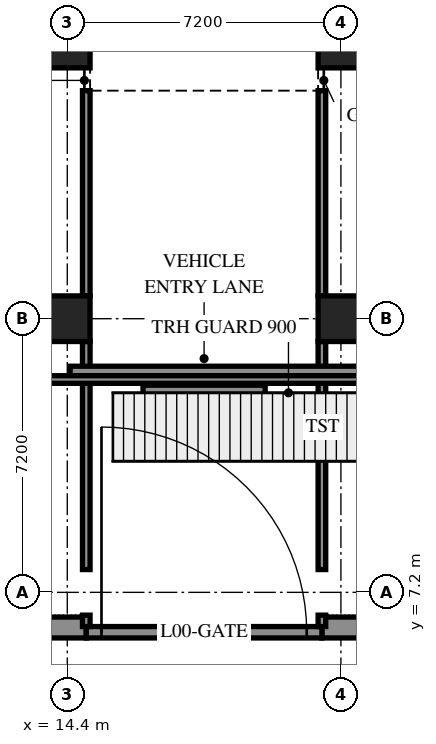
"""IFC4 building model, lengths in metres.
Left out: names, types, materials, properties, quantities, classifications, styles, units other than length and angle.
Written with IfcOpenShell. Run it as: python <this file> out.ifc"""

import sys

from ifc_helpers import new_model, si_unit, direction, frame, frame_2d, origin, origin_2d, place, context, subcontext, project, spatial, polyline, rectangle, outline, extrude, element, fill, save


model = new_model("IFC4")
c1 = context("Model", 3, precision=1e-05, world=origin(), true_north=direction((0.0, 1.0)))
c2 = subcontext(c1, "Body", "Model", "MODEL_VIEW")
j1 = project(units=[si_unit("LENGTHUNIT", "METRE"), si_unit("PLANEANGLEUNIT", "RADIAN")], contexts=[c1])
p1 = place(None, origin())
s1 = spatial("IfcSite", under=j1, at=p1, CompositionType="ELEMENT")
p2 = place(p1, origin())
s2 = spatial("IfcBuilding", under=s1, at=p2, CompositionType="ELEMENT")
p3 = place(p2, origin())
s3 = spatial("IfcBuildingStorey", under=s2, at=p3, CompositionType="ELEMENT", Elevation=0.0)
for number, where, z_axis, x_axis in (
    (1, (14.4, 14.4, 0.0), (0.0, 0.0, 1.0), (1.0, 0.0, 0.0)),
    (2, (14.4, 21.6, 0.0), (0.0, 0.0, 1.0), (1.0, 0.0, 0.0)),
    (3, (21.6, 14.4, 0.0), (0.0, 0.0, 1.0), (1.0, 0.0, 0.0)),
    (4, (21.6, 21.6, 0.0), (0.0, 0.0, 1.0), (1.0, 0.0, 0.0)),
):
    element("IfcColumn", number, at=place(p3, frame(where, z_axis=z_axis, x_axis=x_axis)), inside=s3, PredefinedType="COLUMN", context=c2, shape_type="SweptSolid", body=[
        extrude(rectangle(XDim=1.2, YDim=1.2, at=origin_2d()), origin(), (0.0, 0.0, 1.0), 5.6),
    ])
p4 = place(p3, frame((13.475, 6.275, 0.0), z_axis=(0.0, 0.0, 1.0), x_axis=(1.0, 0.0, 0.0)))
e5 = element("IfcWall", 5, at=p4, inside=s3, PredefinedType="SOLIDWALL", context=c2, shape_type="SweptSolid", body=[
    extrude(outline(polyline([(-0.275, -0.275), (1.425, -0.275), (1.425, 0.275), (0.275, 0.275), (-0.275, -0.275)])), origin(), (0.0, 0.0, 1.0), 5.6),
])
p5 = place(p3, frame((21.1, 6.275, 0.0), z_axis=(0.0, 0.0, 1.0), x_axis=(1.0, 0.0, 0.0)))
e6 = element("IfcWall", 6, at=p5, inside=s3, PredefinedType="SOLIDWALL", context=c2, shape_type="SweptSolid", body=[
    extrude(outline(polyline([(0.0, -0.275), (52.1, -0.275), (51.55, 0.275), (0.0, 0.275), (0.0, -0.275)])), origin(), (0.0, 0.0, 1.0), 5.6),
])
p6 = place(p5, frame((1.4, 0.0, 0.7)))
e7 = element("IfcOpeningElement", 7, at=p6, cuts=e6, PredefinedType="OPENING", context=c2, shape_type="SweptSolid", body=[
    extrude(rectangle(XDim=1.8, YDim=3.4, at=frame_2d((0.9, 1.7))), frame((0.0, 0.285, 0.0), z_axis=(0.0, -1.0, 0.0), x_axis=(1.0, 0.0, 0.0)), (0.0, 0.0, 1.0), 0.57),
])
p7 = place(p5, frame((5.0, 0.0, 0.7)))
e8 = element("IfcOpeningElement", 8, at=p7, cuts=e6, PredefinedType="OPENING", context=c2, shape_type="SweptSolid", body=[
    extrude(rectangle(XDim=1.8, YDim=3.4, at=frame_2d((0.9, 1.7))), frame((0.0, 0.285, 0.0), z_axis=(0.0, -1.0, 0.0), x_axis=(1.0, 0.0, 0.0)), (0.0, 0.0, 1.0), 0.57),
])
p8 = place(p5, frame((8.6, 0.0, 0.7)))
e9 = element("IfcOpeningElement", 9, at=p8, cuts=e6, PredefinedType="OPENING", context=c2, shape_type="SweptSolid", body=[
    extrude(rectangle(XDim=1.8, YDim=3.4, at=frame_2d((0.9, 1.7))), frame((0.0, 0.285, 0.0), z_axis=(0.0, -1.0, 0.0), x_axis=(1.0, 0.0, 0.0)), (0.0, 0.0, 1.0), 0.57),
])
p9 = place(p5, frame((12.2, 0.0, 0.7)))
e10 = element("IfcOpeningElement", 10, at=p9, cuts=e6, PredefinedType="OPENING", context=c2, shape_type="SweptSolid", body=[
    extrude(rectangle(XDim=1.8, YDim=3.4, at=frame_2d((0.9, 1.7))), frame((0.0, 0.285, 0.0), z_axis=(0.0, -1.0, 0.0), x_axis=(1.0, 0.0, 0.0)), (0.0, 0.0, 1.0), 0.57),
])
p10 = place(p5, frame((15.8, 0.0, 0.7)))
e11 = element("IfcOpeningElement", 11, at=p10, cuts=e6, PredefinedType="OPENING", context=c2, shape_type="SweptSolid", body=[
    extrude(rectangle(XDim=1.8, YDim=3.4, at=frame_2d((0.9, 1.7))), frame((0.0, 0.285, 0.0), z_axis=(0.0, -1.0, 0.0), x_axis=(1.0, 0.0, 0.0)), (0.0, 0.0, 1.0), 0.57),
])
p11 = place(p5, frame((19.4, 0.0, 0.7)))
e12 = element("IfcOpeningElement", 12, at=p11, cuts=e6, PredefinedType="OPENING", context=c2, shape_type="SweptSolid", body=[
    extrude(rectangle(XDim=1.8, YDim=3.4, at=frame_2d((0.9, 1.7))), frame((0.0, 0.285, 0.0), z_axis=(0.0, -1.0, 0.0), x_axis=(1.0, 0.0, 0.0)), (0.0, 0.0, 1.0), 0.57),
])
p12 = place(p5, frame((23.0, 0.0, 0.7)))
e13 = element("IfcOpeningElement", 13, at=p12, cuts=e6, PredefinedType="OPENING", context=c2, shape_type="SweptSolid", body=[
    extrude(rectangle(XDim=1.8, YDim=3.4, at=frame_2d((0.9, 1.7))), frame((0.0, 0.285, 0.0), z_axis=(0.0, -1.0, 0.0), x_axis=(1.0, 0.0, 0.0)), (0.0, 0.0, 1.0), 0.57),
])
p13 = place(p5, frame((26.6, 0.0, 0.7)))
e14 = element("IfcOpeningElement", 14, at=p13, cuts=e6, PredefinedType="OPENING", context=c2, shape_type="SweptSolid", body=[
    extrude(rectangle(XDim=1.8, YDim=3.4, at=frame_2d((0.9, 1.7))), frame((0.0, 0.285, 0.0), z_axis=(0.0, -1.0, 0.0), x_axis=(1.0, 0.0, 0.0)), (0.0, 0.0, 1.0), 0.57),
])
p14 = place(p5, frame((30.2, 0.0, 0.7)))
e15 = element("IfcOpeningElement", 15, at=p14, cuts=e6, PredefinedType="OPENING", context=c2, shape_type="SweptSolid", body=[
    extrude(rectangle(XDim=1.8, YDim=3.4, at=frame_2d((0.9, 1.7))), frame((0.0, 0.285, 0.0), z_axis=(0.0, -1.0, 0.0), x_axis=(1.0, 0.0, 0.0)), (0.0, 0.0, 1.0), 0.57),
])
p15 = place(p5, frame((33.8, 0.0, 0.7)))
e16 = element("IfcOpeningElement", 16, at=p15, cuts=e6, PredefinedType="OPENING", context=c2, shape_type="SweptSolid", body=[
    extrude(rectangle(XDim=1.8, YDim=3.4, at=frame_2d((0.9, 1.7))), frame((0.0, 0.285, 0.0), z_axis=(0.0, -1.0, 0.0), x_axis=(1.0, 0.0, 0.0)), (0.0, 0.0, 1.0), 0.57),
])
p16 = place(p5, frame((37.4, 0.0, 0.7)))
e17 = element("IfcOpeningElement", 17, at=p16, cuts=e6, PredefinedType="OPENING", context=c2, shape_type="SweptSolid", body=[
    extrude(rectangle(XDim=1.8, YDim=3.4, at=frame_2d((0.9, 1.7))), frame((0.0, 0.285, 0.0), z_axis=(0.0, -1.0, 0.0), x_axis=(1.0, 0.0, 0.0)), (0.0, 0.0, 1.0), 0.57),
])
p17 = place(p5, frame((41.0, 0.0, 0.7)))
e18 = element("IfcOpeningElement", 18, at=p17, cuts=e6, PredefinedType="OPENING", context=c2, shape_type="SweptSolid", body=[
    extrude(rectangle(XDim=1.8, YDim=3.4, at=frame_2d((0.9, 1.7))), frame((0.0, 0.285, 0.0), z_axis=(0.0, -1.0, 0.0), x_axis=(1.0, 0.0, 0.0)), (0.0, 0.0, 1.0), 0.57),
])
p18 = place(p5, frame((44.6, 0.0, 0.7)))
e19 = element("IfcOpeningElement", 19, at=p18, cuts=e6, PredefinedType="OPENING", context=c2, shape_type="SweptSolid", body=[
    extrude(rectangle(XDim=1.8, YDim=3.4, at=frame_2d((0.9, 1.7))), frame((0.0, 0.285, 0.0), z_axis=(0.0, -1.0, 0.0), x_axis=(1.0, 0.0, 0.0)), (0.0, 0.0, 1.0), 0.57),
])
p19 = place(p5, frame((48.2, 0.0, 0.7)))
e20 = element("IfcOpeningElement", 20, at=p19, cuts=e6, PredefinedType="OPENING", context=c2, shape_type="SweptSolid", body=[
    extrude(rectangle(XDim=1.8, YDim=3.4, at=frame_2d((0.9, 1.7))), frame((0.0, 0.285, 0.0), z_axis=(0.0, -1.0, 0.0), x_axis=(1.0, 0.0, 0.0)), (0.0, 0.0, 1.0), 0.57),
])
p20 = place(p3, frame((22.068, 12.35, 0.0), z_axis=(0.0, 0.0, 1.0), x_axis=(0.0, -1.0, 0.0)))
e21 = element("IfcWall", 21, at=p20, inside=s3, PredefinedType="SOLIDWALL", context=c2, shape_type="SweptSolid", body=[
    extrude(rectangle(XDim=1.6, YDim=0.3, at=frame_2d((0.8, 0.0))), origin(), (0.0, 0.0, 1.0), 3.877),
])
p21 = place(p3, frame((18.834, 12.35, 0.0), z_axis=(0.0, 0.0, 1.0), x_axis=(0.0, -1.0, 0.0)))
e22 = element("IfcWall", 22, at=p21, inside=s3, PredefinedType="SOLIDWALL", context=c2, shape_type="SweptSolid", body=[
    extrude(rectangle(XDim=1.6, YDim=0.3, at=frame_2d((0.8, 0.0))), origin(), (0.0, 0.0, 1.0), 1.838),
])
p22 = place(p3, frame((14.9, 6.15, 0.0), z_axis=(0.0, 0.0, 1.0), x_axis=(1.0, 0.0, 0.0)))
e23 = element("IfcWall", 23, at=p22, inside=s3, PredefinedType="PARTITIONING", context=c2, shape_type="SweptSolid", body=[
    extrude(rectangle(XDim=6.2, YDim=0.3, at=frame_2d((3.1, 0.0))), origin(), (0.0, 0.0, 1.0), 5.6),
])
p23 = place(p22, frame((0.4, 0.0, 0.0)))
e24 = element("IfcOpeningElement", 24, at=p23, cuts=e23, PredefinedType="OPENING", context=c2, shape_type="SweptSolid", body=[
    extrude(rectangle(XDim=5.4, YDim=4.5, at=frame_2d((2.7, 2.25))), frame((0.0, 0.16, 0.0), z_axis=(0.0, -1.0, 0.0), x_axis=(1.0, 0.0, 0.0)), (0.0, 0.0, 1.0), 0.32),
])
p24 = place(p3, frame((14.9, 6.3, 0.0), z_axis=(0.0, 0.0, 1.0), x_axis=(0.0, 1.0, 0.0)))
e25 = element("IfcWall", 25, at=p24, inside=s3, PredefinedType="PARTITIONING", context=c2, shape_type="SweptSolid", body=[
    extrude(rectangle(XDim=0.3, YDim=0.2, at=frame_2d((0.15, 0.0))), origin(), (0.0, 0.0, 1.0), 5.6),
])
p25 = place(p3, frame((14.9, 7.8, 0.0), z_axis=(0.0, 0.0, 1.0), x_axis=(0.0, 1.0, 0.0)))
e26 = element("IfcWall", 26, at=p25, inside=s3, PredefinedType="PARTITIONING", context=c2, shape_type="SweptSolid", body=[
    extrude(rectangle(XDim=6.0, YDim=0.2, at=frame_2d((3.0, 0.0))), origin(), (0.0, 0.0, 1.0), 5.6),
])
p26 = place(p3, frame((14.9, 15.0, 0.0), z_axis=(0.0, 0.0, 1.0), x_axis=(0.0, 1.0, 0.0)))
e27 = element("IfcWall", 27, at=p26, inside=s3, PredefinedType="PARTITIONING", context=c2, shape_type="SweptSolid", body=[
    extrude(rectangle(XDim=5.4, YDim=0.2, at=frame_2d((2.7, 0.0))), origin(), (0.0, 0.0, 1.0), 5.6),
])
p27 = place(p3, frame((21.1, 6.3, 0.0), z_axis=(0.0, 0.0, 1.0), x_axis=(0.0, 1.0, 0.0)))
e28 = element("IfcWall", 28, at=p27, inside=s3, PredefinedType="PARTITIONING", context=c2, shape_type="SweptSolid", body=[
    extrude(rectangle(XDim=0.3, YDim=0.2, at=frame_2d((0.15, 0.0))), origin(), (0.0, 0.0, 1.0), 5.6),
])
p28 = place(p3, frame((21.1, 7.8, 0.0), z_axis=(0.0, 0.0, 1.0), x_axis=(0.0, 1.0, 0.0)))
e29 = element("IfcWall", 29, at=p28, inside=s3, PredefinedType="PARTITIONING", context=c2, shape_type="SweptSolid", body=[
    extrude(rectangle(XDim=6.0, YDim=0.2, at=frame_2d((3.0, 0.0))), origin(), (0.0, 0.0, 1.0), 5.6),
])
p29 = place(p3, frame((21.1, 15.0, 0.0), z_axis=(0.0, 0.0, 1.0), x_axis=(0.0, 1.0, 0.0)))
e30 = element("IfcWall", 30, at=p29, inside=s3, PredefinedType="PARTITIONING", context=c2, shape_type="SweptSolid", body=[
    extrude(rectangle(XDim=5.4, YDim=0.2, at=frame_2d((2.7, 0.0))), origin(), (0.0, 0.0, 1.0), 5.6),
])
p30 = place(p3, frame((71.925, 13.025, 0.0), z_axis=(0.0, 0.0, 1.0), x_axis=(-1.0, 0.0, 0.0)))
e31 = element("IfcWall", 31, at=p30, inside=s3, PredefinedType="SOLIDWALL", context=c2, shape_type="SweptSolid", body=[
    extrude(rectangle(XDim=57.45, YDim=0.25, at=frame_2d((28.725, 0.0))), origin(), (0.0, 0.0, 1.0), 5.6),
])
p31 = place(p30, frame((12.325, 0.0, 0.0)))
e32 = element("IfcOpeningElement", 32, at=p31, cuts=e31, PredefinedType="OPENING", context=c2, shape_type="SweptSolid", body=[
    extrude(rectangle(XDim=1.0, YDim=2.1, at=frame_2d((0.5, 1.05))), frame((0.0, 0.135, 0.0), z_axis=(0.0, -1.0, 0.0), x_axis=(1.0, 0.0, 0.0)), (0.0, 0.0, 1.0), 0.27),
])
p32 = place(p30, frame((44.125, 0.0, 0.0)))
e33 = element("IfcOpeningElement", 33, at=p32, cuts=e31, PredefinedType="OPENING", context=c2, shape_type="SweptSolid", body=[
    extrude(rectangle(XDim=1.0, YDim=2.1, at=frame_2d((0.5, 1.05))), frame((0.0, 0.135, 0.0), z_axis=(0.0, -1.0, 0.0), x_axis=(1.0, 0.0, 0.0)), (0.0, 0.0, 1.0), 0.27),
])
p33 = place(p3, frame((26.53, 12.8, 0.0), z_axis=(0.0, 0.0, 1.0), x_axis=(-1.0, 0.0, 0.0)))
e34 = element("IfcWall", 34, at=p33, inside=s3, PredefinedType="PARAPET", context=c2, shape_type="SweptSolid", body=[
    extrude(outline(polyline([(0.0, -0.1), (12.78, -0.1), (12.78, 0.1), (0.0, 0.1), (0.0, -0.1)])), origin(), (0.0, 0.0, 1.0), 0.25),
])
p34 = place(p3, frame((19.607, 12.25, 0.0), z_axis=(0.0, 0.0, 1.0), x_axis=(-1.0, 0.0, 0.0)))
e35 = element("IfcWall", 35, at=p34, inside=s3, PredefinedType="SOLIDWALL", context=c2, shape_type="SweptSolid", body=[
    extrude(outline(polyline([(0.0, -0.4), (3.214, -0.4), (3.214, 0.4), (0.0, 0.4), (0.0, -0.4)])), origin(), (0.0, 0.0, 1.0), 0.65),
])
p35 = place(p23, origin())
e36 = element("IfcDoor", 36, at=p35, inside=s3, OperationType="ROLLINGUP", PredefinedType="GATE", context=c2, shape_type="SweptSolid", body=[
    extrude(rectangle(XDim=5.4, YDim=4.5, at=frame_2d((2.7, 2.25))), frame((0.0, 0.025, 0.0), z_axis=(0.0, -1.0, 0.0), x_axis=(1.0, 0.0, 0.0)), (0.0, 0.0, 1.0), 0.05),
])
fill(e24, e36)
save(model, sys.argv[1])
